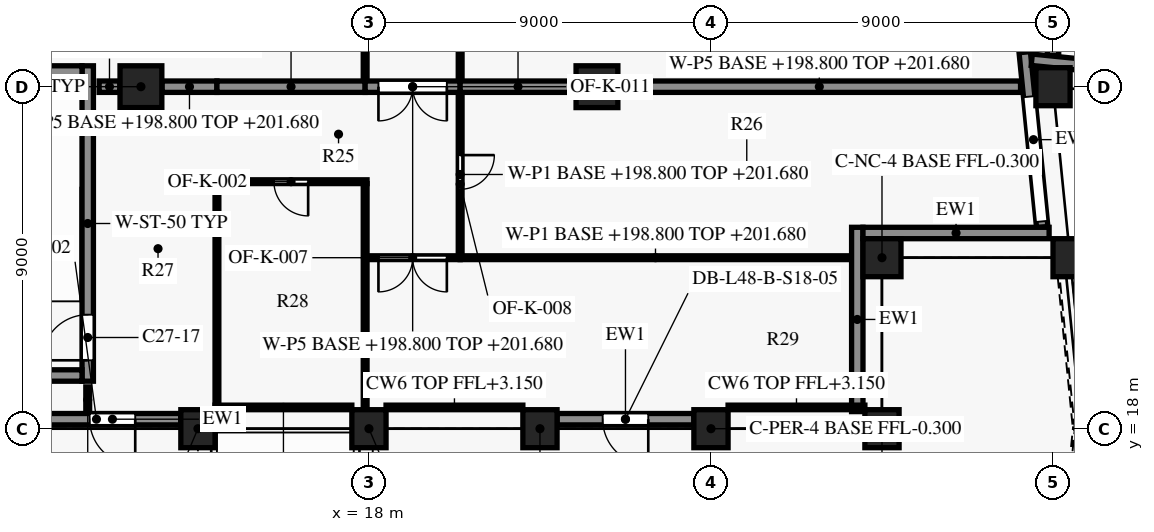
"""IFC4 building model, lengths in metres.
Left out: names, types, materials, properties, quantities, classifications, styles, units other than length and angle.
Written with IfcOpenShell. Run it as: python <this file> out.ifc"""

import sys

from ifc_helpers import new_model, si_unit, direction, frame, frame_2d, origin, origin_2d, place, context, subcontext, project, spatial, rectangle, extrude, element, fill, save


model = new_model("IFC4")
c1 = context("Model", 3, precision=1e-05, world=origin(), true_north=direction((0.0, 1.0)))
c2 = subcontext(c1, "Body", "Model", "MODEL_VIEW")
j1 = project(units=[si_unit("LENGTHUNIT", "METRE"), si_unit("PLANEANGLEUNIT", "RADIAN")], contexts=[c1])
p1 = place(None, origin())
s1 = spatial("IfcSite", under=j1, at=p1, CompositionType="ELEMENT")
p2 = place(p1, origin())
s2 = spatial("IfcBuilding", under=s1, at=p2, CompositionType="ELEMENT")
p3 = place(p2, frame((0.0, 0.0, 198.8)))
s3 = spatial("IfcBuildingStorey", under=s2, at=p3, CompositionType="ELEMENT", Elevation=198.8)
for number, where, z_axis, x_axis in (
    (1, (13.5, 18.0, -0.3), (0.0, 0.0, 1.0), (1.0, 0.0, 0.0)),
    (2, (18.0, 18.0, -0.3), (0.0, 0.0, 1.0), (1.0, 0.0, 0.0)),
    (3, (22.5, 18.0, -0.3), (0.0, 0.0, 1.0), (1.0, 0.0, 0.0)),
    (4, (27.0, 18.0, -0.3), (0.0, 0.0, 1.0), (1.0, 0.0, 0.0)),
    (5, (31.5, 18.0, -0.3), (0.0, 0.0, 1.0), (1.0, 0.0, 0.0)),
):
    element("IfcColumn", number, at=place(p3, frame(where, z_axis=z_axis, x_axis=x_axis)), inside=s3, PredefinedType="COLUMN", context=c2, shape_type="SweptSolid", body=[
        extrude(rectangle(XDim=0.9, YDim=1.0, at=origin_2d()), origin(), (0.0, 0.0, 1.0), 4.1),
    ])
for number, where, z_axis, x_axis in (
    (6, (36.45, 22.5, 0.0), (0.0, 0.0, 1.0), (-0.1, 0.995, 0.0)),
    (7, (36.0, 27.0, 0.0), (0.0, 0.0, 1.0), (-0.1, 0.995, 0.0)),
):
    element("IfcColumn", number, at=place(p3, frame(where, z_axis=z_axis, x_axis=x_axis)), inside=s3, PredefinedType="COLUMN", context=c2, shape_type="SweptSolid", body=[
        extrude(rectangle(XDim=0.9, YDim=1.0, at=origin_2d()), origin(), (0.0, 0.0, 1.0), 3.8),
    ])
p4 = place(p3, frame((31.5, 22.5, -0.3), z_axis=(0.0, 0.0, 1.0), x_axis=(1.0, 0.0, 0.0)))
e8 = element("IfcColumn", 8, at=p4, inside=s3, PredefinedType="COLUMN", context=c2, shape_type="SweptSolid", body=[
    extrude(rectangle(XDim=1.0, YDim=1.0, at=origin_2d()), origin(), (0.0, 0.0, 1.0), 4.1),
])
for number, where, z_axis, x_axis in (
    (9, (12.0, 27.0, 0.0), (0.0, 0.0, 1.0), (1.0, 0.0, 0.0)),
    (10, (24.0, 27.0, 0.0), (0.0, 0.0, 1.0), (1.0, 0.0, 0.0)),
):
    element("IfcColumn", number, at=place(p3, frame(where, z_axis=z_axis, x_axis=x_axis)), inside=s3, PredefinedType="COLUMN", context=c2, shape_type="SweptSolid", body=[
        extrude(rectangle(XDim=1.1, YDim=1.1, at=origin_2d()), origin(), (0.0, 0.0, 1.0), 3.8),
    ])
p5 = place(p3, frame((30.85, 23.3, 0.0), z_axis=(0.0, 0.0, 1.0), x_axis=(0.0, -1.0, 0.0)))
e11 = element("IfcWall", 11, at=p5, inside=s3, PredefinedType="SOLIDWALL", context=c2, shape_type="SweptSolid", body=[
    extrude(rectangle(XDim=4.85, YDim=0.3, at=frame_2d((2.425, 0.0))), origin(), (0.0, 0.0, 1.0), 3.15),
])
p6 = place(p3, frame((35.897, 23.15, 0.0), z_axis=(0.0, 0.0, 1.0), x_axis=(-1.0, 0.0, 0.0)))
e12 = element("IfcWall", 12, at=p6, inside=s3, PredefinedType="SOLIDWALL", context=c2, shape_type="SweptSolid", body=[
    extrude(rectangle(XDim=4.897, YDim=0.3, at=frame_2d((2.449, 0.0))), origin(), (0.0, 0.0, 1.0), 3.15),
])
p7 = place(p3, frame((35.256, 27.908, 0.0), z_axis=(0.0, 0.0, 1.0), x_axis=(0.099535070904, -0.995034054523, 0.0)))
e13 = element("IfcWall", 13, at=p7, inside=s3, PredefinedType="SOLIDWALL", context=c2, shape_type="SweptSolid", body=[
    extrude(rectangle(XDim=4.626, YDim=0.3, at=frame_2d((2.313, 0.0))), origin(), (0.0, 0.0, 1.0), 3.15),
])
p8 = place(p7, frame((1.176, 0.0, 0.15)))
e14 = element("IfcOpeningElement", 14, at=p8, cuts=e13, PredefinedType="OPENING", context=c2, shape_type="SweptSolid", body=[
    extrude(rectangle(XDim=3.3, YDim=2.4, at=frame_2d((1.65, 1.2))), frame((0.0, 0.16, 0.0), z_axis=(0.0, -1.0, 0.0), x_axis=(1.0, 0.0, 0.0)), (0.0, 0.0, 1.0), 0.32),
])
p9 = place(p3, frame((45.015, 26.752, 0.0), z_axis=(0.0, 0.0, 1.0), x_axis=(-0.9950379439, 0.099496181828, 0.0)))
e15 = element("IfcWall", 15, at=p9, inside=s3, PredefinedType="SOLIDWALL", context=c2, shape_type="SweptSolid", body=[
    extrude(rectangle(XDim=9.621, YDim=0.3, at=frame_2d((4.811, 0.0))), origin(), (0.0, 0.0, 1.0), 3.15),
])
p10 = place(p9, frame((1.311, 0.0, 0.75)))
e16 = element("IfcOpeningElement", 16, at=p10, cuts=e15, PredefinedType="OPENING", context=c2, shape_type="SweptSolid", body=[
    extrude(rectangle(XDim=1.8, YDim=1.8, at=frame_2d((0.9, 0.9))), frame((0.0, 0.16, 0.0), z_axis=(0.0, -1.0, 0.0), x_axis=(1.0, 0.0, 0.0)), (0.0, 0.0, 1.0), 0.32),
])
p11 = place(p9, frame((5.083, 0.0, 0.15)))
e17 = element("IfcOpeningElement", 17, at=p11, cuts=e15, PredefinedType="OPENING", context=c2, shape_type="SweptSolid", body=[
    extrude(rectangle(XDim=3.3, YDim=2.4, at=frame_2d((1.65, 1.2))), frame((0.0, 0.16, 0.0), z_axis=(0.0, -1.0, 0.0), x_axis=(1.0, 0.0, 0.0)), (0.0, 0.0, 1.0), 0.32),
])
p12 = place(p3, frame((13.05, 18.25, 0.0), z_axis=(0.0, 0.0, 1.0), x_axis=(-1.0, 0.0, 0.0)))
e18 = element("IfcWall", 18, at=p12, inside=s3, PredefinedType="SOLIDWALL", context=c2, shape_type="SweptSolid", body=[
    extrude(rectangle(XDim=3.6, YDim=0.3, at=frame_2d((1.8, 0.0))), origin(), (0.0, 0.0, 1.0), 3.15),
])
p13 = place(p12, frame((1.2, 0.0, 0.0)))
e19 = element("IfcOpeningElement", 19, at=p13, cuts=e18, PredefinedType="OPENING", context=c2, shape_type="SweptSolid", body=[
    extrude(rectangle(XDim=1.2, YDim=2.5, at=frame_2d((0.6, 1.25))), frame((0.0, 0.16, 0.0), z_axis=(0.0, -1.0, 0.0), x_axis=(1.0, 0.0, 0.0)), (0.0, 0.0, 1.0), 0.32),
])
p14 = place(p3, frame((26.55, 18.25, 0.0), z_axis=(0.0, 0.0, 1.0), x_axis=(-1.0, 0.0, 0.0)))
e20 = element("IfcWall", 20, at=p14, inside=s3, PredefinedType="SOLIDWALL", context=c2, shape_type="SweptSolid", body=[
    extrude(rectangle(XDim=3.6, YDim=0.3, at=frame_2d((1.8, 0.0))), origin(), (0.0, 0.0, 1.0), 3.15),
])
p15 = place(p14, frame((1.2, 0.0, 0.0)))
e21 = element("IfcOpeningElement", 21, at=p15, cuts=e20, PredefinedType="OPENING", context=c2, shape_type="SweptSolid", body=[
    extrude(rectangle(XDim=1.2, YDim=2.5, at=frame_2d((0.6, 1.25))), frame((0.0, 0.16, 0.0), z_axis=(0.0, -1.0, 0.0), x_axis=(1.0, 0.0, 0.0)), (0.0, 0.0, 1.0), 0.32),
])
for number, where, z_axis, x_axis in (
    (22, (7.15, 19.4, 0.0), (0.0, 0.0, 1.0), (1.0, 0.0, 0.0)),
    (23, (7.15, 27.4, 0.0), (0.0, 0.0, 1.0), (1.0, 0.0, 0.0)),
):
    element("IfcWall", number, at=place(p3, frame(where, z_axis=z_axis, x_axis=x_axis)), inside=s3, PredefinedType="SHEAR", context=c2, shape_type="SweptSolid", body=[
        extrude(rectangle(XDim=3.3, YDim=0.3, at=frame_2d((1.65, 0.0))), origin(), (0.0, 0.0, 1.0), 3.5),
    ])
p16 = place(p3, frame((10.6, 19.25, 0.0), z_axis=(0.0, 0.0, 1.0), x_axis=(0.0, 1.0, 0.0)))
e24 = element("IfcWall", 24, at=p16, inside=s3, PredefinedType="SHEAR", context=c2, shape_type="SweptSolid", body=[
    extrude(rectangle(XDim=8.3, YDim=0.3, at=frame_2d((4.15, 0.0))), origin(), (0.0, 0.0, 1.0), 3.5),
])
p17 = place(p16, frame((0.55, 0.0, 0.0)))
e25 = element("IfcOpeningElement", 25, at=p17, cuts=e24, PredefinedType="OPENING", context=c2, shape_type="SweptSolid", body=[
    extrude(rectangle(XDim=1.2, YDim=2.2, at=frame_2d((0.6, 1.1))), frame((0.0, 0.16, 0.0), z_axis=(0.0, -1.0, 0.0), x_axis=(1.0, 0.0, 0.0)), (0.0, 0.0, 1.0), 0.32),
])
p18 = place(p3, frame((10.6, 18.42, 0.0), z_axis=(0.0, 0.0, 1.0), x_axis=(0.0, 1.0, 0.0)))
e26 = element("IfcWall", 26, at=p18, inside=s3, PredefinedType="PARTITIONING", context=c2, shape_type="SweptSolid", body=[
    extrude(rectangle(XDim=0.68, YDim=0.1, at=frame_2d((0.34, 0.0))), origin(), (0.0, 0.0, 1.0), 3.48),
])
p19 = place(p3, frame((17.9, 22.45, 0.0), z_axis=(0.0, 0.0, 1.0), x_axis=(0.0, -1.0, 0.0)))
e27 = element("IfcWall", 27, at=p19, inside=s3, PredefinedType="PARTITIONING", context=c2, shape_type="SweptSolid", body=[
    extrude(rectangle(XDim=3.93, YDim=0.1, at=frame_2d((1.965, 0.0))), origin(), (0.0, 0.0, 1.0), 3.48),
])
p20 = place(p3, frame((20.4, 22.5, 0.0), z_axis=(0.0, 0.0, 1.0), x_axis=(-1.0, 0.0, 0.0)))
e28 = element("IfcWall", 28, at=p20, inside=s3, PredefinedType="PARTITIONING", context=c2, shape_type="SweptSolid", body=[
    extrude(rectangle(XDim=2.45, YDim=0.1, at=frame_2d((1.225, 0.0))), origin(), (0.0, 0.0, 1.0), 3.48),
])
p21 = place(p20, frame((0.35, 0.0, 0.0)))
e29 = element("IfcOpeningElement", 29, at=p21, cuts=e28, PredefinedType="OPENING", context=c2, shape_type="SweptSolid", body=[
    extrude(rectangle(XDim=1.8, YDim=2.1, at=frame_2d((0.9, 1.05))), frame((0.0, 0.06, 0.0), z_axis=(0.0, -1.0, 0.0), x_axis=(1.0, 0.0, 0.0)), (0.0, 0.0, 1.0), 0.12),
])
p22 = place(p3, frame((20.4, 22.5, 0.0), z_axis=(0.0, 0.0, 1.0), x_axis=(1.0, 0.0, 0.0)))
e30 = element("IfcWall", 30, at=p22, inside=s3, PredefinedType="PARTITIONING", context=c2, shape_type="SweptSolid", body=[
    extrude(rectangle(XDim=10.28, YDim=0.1, at=frame_2d((5.14, 0.0))), origin(), (0.0, 0.0, 1.0), 2.88),
])
p23 = place(p3, frame((17.9, 22.55, 0.0), z_axis=(0.0, 0.0, 1.0), x_axis=(0.0, 1.0, 0.0)))
e31 = element("IfcWall", 31, at=p23, inside=s3, PredefinedType="PARTITIONING", context=c2, shape_type="SweptSolid", body=[
    extrude(rectangle(XDim=1.9, YDim=0.1, at=frame_2d((0.95, 0.0))), origin(), (0.0, 0.0, 1.0), 3.48),
])
p24 = place(p3, frame((14.0, 24.45, 0.0), z_axis=(0.0, 0.0, 1.0), x_axis=(0.0, -1.0, 0.0)))
e32 = element("IfcWall", 32, at=p24, inside=s3, PredefinedType="PARTITIONING", context=c2, shape_type="SweptSolid", body=[
    extrude(rectangle(XDim=5.81, YDim=0.1, at=frame_2d((2.905, 0.0))), origin(), (0.0, 0.0, 1.0), 3.48),
])
p25 = place(p3, frame((17.95, 24.5, 0.0), z_axis=(0.0, 0.0, 1.0), x_axis=(-1.0, 0.0, 0.0)))
e33 = element("IfcWall", 33, at=p25, inside=s3, PredefinedType="PARTITIONING", context=c2, shape_type="SweptSolid", body=[
    extrude(rectangle(XDim=4.0, YDim=0.1, at=frame_2d((2.0, 0.0))), origin(), (0.0, 0.0, 1.0), 3.48),
])
p26 = place(p25, frame((1.55, 0.0, 0.0)))
e34 = element("IfcOpeningElement", 34, at=p26, cuts=e33, PredefinedType="OPENING", context=c2, shape_type="SweptSolid", body=[
    extrude(rectangle(XDim=0.9, YDim=2.1, at=frame_2d((0.45, 1.05))), frame((0.0, 0.06, 0.0), z_axis=(0.0, -1.0, 0.0), x_axis=(1.0, 0.0, 0.0)), (0.0, 0.0, 1.0), 0.12),
])
p27 = place(p3, frame((20.4, 26.83, 0.0), z_axis=(0.0, 0.0, 1.0), x_axis=(0.0, -1.0, 0.0)))
e35 = element("IfcWall", 35, at=p27, inside=s3, PredefinedType="PARTITIONING", context=c2, shape_type="SweptSolid", body=[
    extrude(rectangle(XDim=4.28, YDim=0.1, at=frame_2d((2.14, 0.0))), origin(), (0.0, 0.0, 1.0), 2.88),
])
p28 = place(p27, frame((1.63, 0.0, 0.0)))
e36 = element("IfcOpeningElement", 36, at=p28, cuts=e35, PredefinedType="OPENING", context=c2, shape_type="SweptSolid", body=[
    extrude(rectangle(XDim=0.9, YDim=2.1, at=frame_2d((0.45, 1.05))), frame((0.0, 0.06, 0.0), z_axis=(0.0, -1.0, 0.0), x_axis=(1.0, 0.0, 0.0)), (0.0, 0.0, 1.0), 0.12),
])
p29 = place(p3, frame((10.9, 27.0, 0.0), z_axis=(0.0, 0.0, 1.0), x_axis=(1.0, 0.0, 0.0)))
e37 = element("IfcWall", 37, at=p29, inside=s3, PredefinedType="PARTITIONING", context=c2, shape_type="SweptSolid", body=[
    extrude(rectangle(XDim=0.545, YDim=0.3, at=frame_2d((0.272, 0.0))), origin(), (0.0, 0.0, 1.0), 3.48),
])
p30 = place(p3, frame((12.555, 27.0, 0.0), z_axis=(0.0, 0.0, 1.0), x_axis=(1.0, 0.0, 0.0)))
e38 = element("IfcWall", 38, at=p30, inside=s3, PredefinedType="PARTITIONING", context=c2, shape_type="SweptSolid", body=[
    extrude(rectangle(XDim=1.445, YDim=0.3, at=frame_2d((0.723, 0.0))), origin(), (0.0, 0.0, 1.0), 2.88),
])
p31 = place(p3, frame((14.0, 27.0, 0.0), z_axis=(0.0, 0.0, 1.0), x_axis=(1.0, 0.0, 0.0)))
e39 = element("IfcWall", 39, at=p31, inside=s3, PredefinedType="PARTITIONING", context=c2, shape_type="SweptSolid", body=[
    extrude(rectangle(XDim=3.9, YDim=0.3, at=frame_2d((1.95, 0.0))), origin(), (0.0, 0.0, 1.0), 2.88),
])
p32 = place(p3, frame((20.4, 27.0, 0.0), z_axis=(0.0, 0.0, 1.0), x_axis=(-1.0, 0.0, 0.0)))
e40 = element("IfcWall", 40, at=p32, inside=s3, PredefinedType="PARTITIONING", context=c2, shape_type="SweptSolid", body=[
    extrude(rectangle(XDim=2.5, YDim=0.3, at=frame_2d((1.25, 0.0))), origin(), (0.0, 0.0, 1.0), 2.88),
])
p33 = place(p32, frame((0.35, 0.0, 0.0)))
e41 = element("IfcOpeningElement", 41, at=p33, cuts=e40, PredefinedType="OPENING", context=c2, shape_type="SweptSolid", body=[
    extrude(rectangle(XDim=1.8, YDim=2.1, at=frame_2d((0.9, 1.05))), frame((0.0, 0.16, 0.0), z_axis=(0.0, -1.0, 0.0), x_axis=(1.0, 0.0, 0.0)), (0.0, 0.0, 1.0), 0.32),
])
p34 = place(p3, frame((20.4, 27.0, 0.0), z_axis=(0.0, 0.0, 1.0), x_axis=(1.0, 0.0, 0.0)))
e42 = element("IfcWall", 42, at=p34, inside=s3, PredefinedType="PARTITIONING", context=c2, shape_type="SweptSolid", body=[
    extrude(rectangle(XDim=3.045, YDim=0.3, at=frame_2d((1.522, 0.0))), origin(), (0.0, 0.0, 1.0), 2.88),
])
p35 = place(p3, frame((24.555, 27.0, 0.0), z_axis=(0.0, 0.0, 1.0), x_axis=(1.0, 0.0, 0.0)))
e43 = element("IfcWall", 43, at=p35, inside=s3, PredefinedType="PARTITIONING", context=c2, shape_type="SweptSolid", body=[
    extrude(rectangle(XDim=10.591, YDim=0.3, at=frame_2d((5.295, 0.0))), origin(), (0.0, 0.0, 1.0), 2.88),
])
p36 = place(p3, frame((17.9, 27.17, 0.0), z_axis=(0.0, 0.0, 1.0), x_axis=(0.0, 1.0, 0.0)))
e44 = element("IfcWall", 44, at=p36, inside=s3, PredefinedType="PARTITIONING", context=c2, shape_type="SweptSolid", body=[
    extrude(rectangle(XDim=6.38, YDim=0.1, at=frame_2d((3.19, 0.0))), origin(), (0.0, 0.0, 1.0), 2.88),
])
p37 = place(p3, frame((36.0, 27.824, 0.0), z_axis=(0.0, 0.0, 1.0), x_axis=(0.0, 1.0, 0.0)))
e45 = element("IfcWall", 45, at=p37, inside=s3, PredefinedType="PARTITIONING", context=c2, shape_type="SweptSolid", body=[
    extrude(rectangle(XDim=10.621, YDim=0.3, at=frame_2d((5.311, 0.0))), origin(), (0.0, 0.0, 1.0), 2.88),
])
p38 = place(p3, frame((20.4, 33.55, 0.0), z_axis=(0.0, 0.0, 1.0), x_axis=(0.0, -1.0, 0.0)))
e46 = element("IfcWall", 46, at=p38, inside=s3, PredefinedType="PARTITIONING", context=c2, shape_type="SweptSolid", body=[
    extrude(rectangle(XDim=6.38, YDim=0.1, at=frame_2d((3.19, 0.0))), origin(), (0.0, 0.0, 1.0), 2.88),
])
p39 = place(p8, origin())
e47 = element("IfcWindow", 47, at=p39, inside=s3, PartitioningType="SINGLE_PANEL", PredefinedType="WINDOW", context=c2, shape_type="SweptSolid", body=[
    extrude(rectangle(XDim=3.3, YDim=2.4, at=frame_2d((1.65, 1.2))), frame((0.0, 0.03, 0.0), z_axis=(0.0, -1.0, 0.0), x_axis=(1.0, 0.0, 0.0)), (0.0, 0.0, 1.0), 0.06),
])
fill(e14, e47)
p40 = place(p13, origin())
e48 = element("IfcDoor", 48, at=p40, inside=s3, OperationType="SINGLE_SWING_RIGHT", PredefinedType="DOOR", context=c2, shape_type="SweptSolid", body=[
    extrude(rectangle(XDim=1.2, YDim=2.5, at=frame_2d((0.6, 1.25))), frame((0.0, 0.025, 0.0), z_axis=(0.0, -1.0, 0.0), x_axis=(1.0, 0.0, 0.0)), (0.0, 0.0, 1.0), 0.05),
])
fill(e19, e48)
p41 = place(p15, origin())
e49 = element("IfcDoor", 49, at=p41, inside=s3, OperationType="SINGLE_SWING_RIGHT", PredefinedType="DOOR", context=c2, shape_type="SweptSolid", body=[
    extrude(rectangle(XDim=1.2, YDim=2.5, at=frame_2d((0.6, 1.25))), frame((0.0, 0.025, 0.0), z_axis=(0.0, -1.0, 0.0), x_axis=(1.0, 0.0, 0.0)), (0.0, 0.0, 1.0), 0.05),
])
fill(e21, e49)
p42 = place(p17, origin())
e50 = element("IfcDoor", 50, at=p42, inside=s3, OperationType="SINGLE_SWING_RIGHT", PredefinedType="DOOR", context=c2, shape_type="SweptSolid", body=[
    extrude(rectangle(XDim=1.2, YDim=2.2, at=frame_2d((0.6, 1.1))), frame((0.0, 0.025, 0.0), z_axis=(0.0, -1.0, 0.0), x_axis=(1.0, 0.0, 0.0)), (0.0, 0.0, 1.0), 0.05),
])
fill(e25, e50)
p43 = place(p26, origin())
e51 = element("IfcDoor", 51, at=p43, inside=s3, OperationType="SINGLE_SWING_RIGHT", PredefinedType="DOOR", context=c2, shape_type="SweptSolid", body=[
    extrude(rectangle(XDim=0.9, YDim=2.1, at=frame_2d((0.45, 1.05))), frame((0.0, 0.025, 0.0), z_axis=(0.0, -1.0, 0.0), x_axis=(1.0, 0.0, 0.0)), (0.0, 0.0, 1.0), 0.05),
])
fill(e34, e51)
p44 = place(p21, origin())
e52 = element("IfcDoor", 52, at=p44, inside=s3, OperationType="DOUBLE_DOOR_SINGLE_SWING", PredefinedType="DOOR", context=c2, shape_type="SweptSolid", body=[
    extrude(rectangle(XDim=1.8, YDim=2.1, at=frame_2d((0.9, 1.05))), frame((0.0, 0.025, 0.0), z_axis=(0.0, -1.0, 0.0), x_axis=(1.0, 0.0, 0.0)), (0.0, 0.0, 1.0), 0.05),
])
fill(e29, e52)
p45 = place(p28, origin())
e53 = element("IfcDoor", 53, at=p45, inside=s3, OperationType="SINGLE_SWING_LEFT", PredefinedType="DOOR", context=c2, shape_type="SweptSolid", body=[
    extrude(rectangle(XDim=0.9, YDim=2.1, at=frame_2d((0.45, 1.05))), frame((0.0, 0.025, 0.0), z_axis=(0.0, -1.0, 0.0), x_axis=(1.0, 0.0, 0.0)), (0.0, 0.0, 1.0), 0.05),
])
fill(e36, e53)
p46 = place(p33, origin())
e54 = element("IfcDoor", 54, at=p46, inside=s3, OperationType="DOUBLE_DOOR_SINGLE_SWING", PredefinedType="DOOR", context=c2, shape_type="SweptSolid", body=[
    extrude(rectangle(XDim=1.8, YDim=2.1, at=frame_2d((0.9, 1.05))), frame((0.0, 0.025, 0.0), z_axis=(0.0, -1.0, 0.0), x_axis=(1.0, 0.0, 0.0)), (0.0, 0.0, 1.0), 0.05),
])
fill(e41, e54)
save(model, sys.argv[1])
